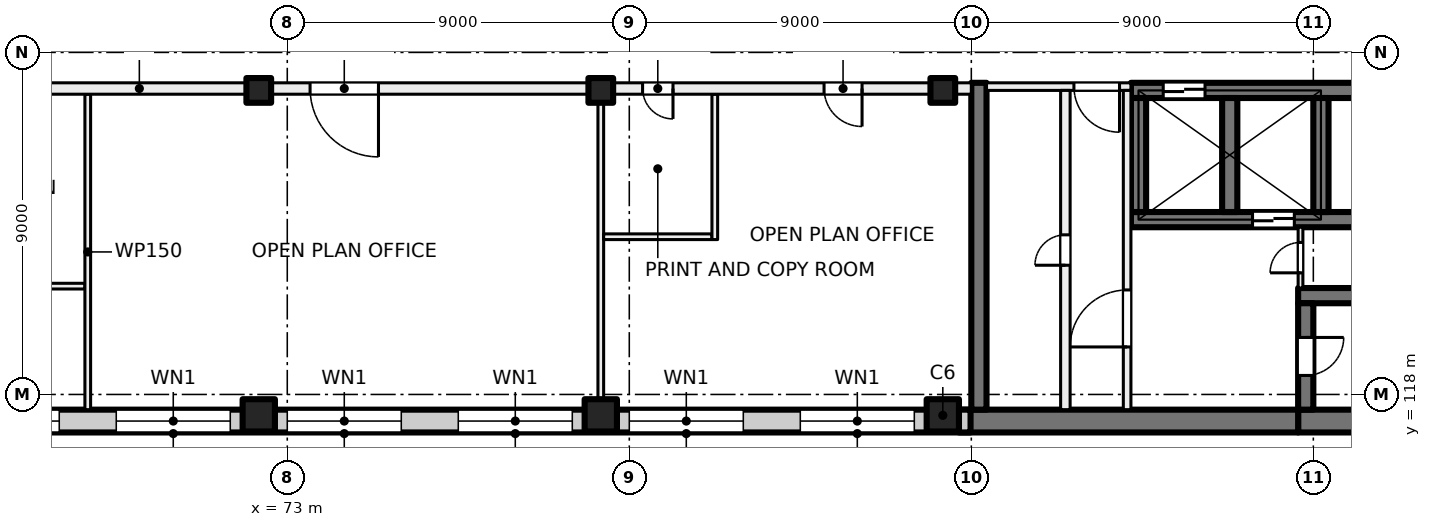
"""IFC4 building model, lengths in metres.
Left out: names, types, materials, properties, quantities, classifications, styles, units other than length and angle.
Written with IfcOpenShell. Run it as: python <this file> out.ifc"""

import sys

from ifc_helpers import new_model, si_unit, direction, frame, frame_2d, origin, origin_2d, place, context, subcontext, project, spatial, rectangle, extrude, element, fill, save


model = new_model("IFC4")
c1 = context("Model", 3, precision=1e-05, world=origin(), true_north=direction((0.0, 1.0)))
c2 = subcontext(c1, "Body", "Model", "MODEL_VIEW")
j1 = project(units=[si_unit("LENGTHUNIT", "METRE"), si_unit("PLANEANGLEUNIT", "RADIAN")], contexts=[c1])
p1 = place(None, origin())
s1 = spatial("IfcSite", under=j1, at=p1, CompositionType="ELEMENT")
p2 = place(p1, origin())
s2 = spatial("IfcBuilding", under=s1, at=p2, CompositionType="ELEMENT")
p3 = place(p2, frame((0.0, 0.0, 101.0)))
s3 = spatial("IfcBuildingStorey", under=s2, at=p3, CompositionType="ELEMENT", Elevation=101.0)
for number, where, z_axis, x_axis in (
    (1, (72.25, 126.0, 0.0), (0.0, 0.0, 1.0), (1.0, 0.0, 0.0)),
    (2, (81.25, 126.0, 0.0), (0.0, 0.0, 1.0), (1.0, 0.0, 0.0)),
    (3, (90.25, 126.0, 0.0), (0.0, 0.0, 1.0), (1.0, 0.0, 0.0)),
):
    element("IfcColumn", number, at=place(p3, frame(where, z_axis=z_axis, x_axis=x_axis)), inside=s3, PredefinedType="COLUMN", context=c2, shape_type="SweptSolid", body=[
        extrude(rectangle(XDim=0.65, YDim=0.65, at=origin_2d()), origin(), (0.0, 0.0, 1.0), 4.0),
    ])
for number, where, z_axis, x_axis in (
    (4, (72.25, 117.45, 0.0), (0.0, 0.0, 1.0), (1.0, 0.0, 0.0)),
    (5, (81.25, 117.45, 0.0), (0.0, 0.0, 1.0), (1.0, 0.0, 0.0)),
    (6, (90.25, 117.45, 0.0), (0.0, 0.0, 1.0), (1.0, 0.0, 0.0)),
):
    element("IfcColumn", number, at=place(p3, frame(where, z_axis=z_axis, x_axis=x_axis)), inside=s3, PredefinedType="COLUMN", context=c2, shape_type="SweptSolid", body=[
        extrude(rectangle(XDim=0.85, YDim=0.85, at=origin_2d()), origin(), (0.0, 0.0, 1.0), 4.0),
    ])
p4 = place(p3, frame((107.4, 117.3, 0.0), z_axis=(0.0, 0.0, 1.0), x_axis=(-1.0, 0.0, 0.0)))
e7 = element("IfcWall", 7, at=p4, inside=s3, PredefinedType="SHEAR", context=c2, shape_type="SweptSolid", body=[
    extrude(rectangle(XDim=7.8, YDim=0.6, at=frame_2d((3.9, 0.0))), origin(), (0.0, 0.0, 1.0), 4.0),
])
p5 = place(p3, frame((99.6, 117.3, 0.0), z_axis=(0.0, 0.0, 1.0), x_axis=(-1.0, 0.0, 0.0)))
e8 = element("IfcWall", 8, at=p5, inside=s3, PredefinedType="SHEAR", context=c2, shape_type="SweptSolid", body=[
    extrude(rectangle(XDim=8.925, YDim=0.6, at=frame_2d((4.462, 0.0))), origin(), (0.0, 0.0, 1.0), 4.0),
])
p6 = place(p3, frame((107.4, 120.6, 0.0), z_axis=(0.0, 0.0, 1.0), x_axis=(-1.0, 0.0, 0.0)))
e9 = element("IfcWall", 9, at=p6, inside=s3, PredefinedType="SHEAR", context=c2, shape_type="SweptSolid", body=[
    extrude(rectangle(XDim=7.8, YDim=0.4, at=frame_2d((3.9, 0.0))), origin(), (0.0, 0.0, 1.0), 4.0),
])
p7 = place(p3, frame((99.8, 120.4, 0.0), z_axis=(0.0, 0.0, 1.0), x_axis=(0.0, -1.0, 0.0)))
e10 = element("IfcWall", 10, at=p7, inside=s3, PredefinedType="SHEAR", context=c2, shape_type="SweptSolid", body=[
    extrude(rectangle(XDim=2.8, YDim=0.4, at=frame_2d((1.4, 0.0))), origin(), (0.0, 0.0, 1.0), 4.0),
])
p8 = place(p7, frame((0.9, 0.0, 0.0)))
e11 = element("IfcOpeningElement", 11, at=p8, cuts=e10, PredefinedType="OPENING", context=c2, shape_type="SweptSolid", body=[
    extrude(rectangle(XDim=1.0, YDim=2.1, at=frame_2d((0.5, 1.05))), frame((0.0, 0.21, 0.0), z_axis=(0.0, -1.0, 0.0), x_axis=(1.0, 0.0, 0.0)), (0.0, 0.0, 1.0), 0.42),
])
p9 = place(p3, frame((107.4, 126.0, 0.0), z_axis=(0.0, 0.0, 1.0), x_axis=(-1.0, 0.0, 0.0)))
e12 = element("IfcWall", 12, at=p9, inside=s3, PredefinedType="SHEAR", context=c2, shape_type="SweptSolid", body=[
    extrude(rectangle(XDim=12.2, YDim=0.4, at=frame_2d((6.1, 0.0))), origin(), (0.0, 0.0, 1.0), 4.0),
])
p10 = place(p9, frame((10.25, 0.0, 0.0)))
e13 = element("IfcOpeningElement", 13, at=p10, cuts=e12, PredefinedType="OPENING", context=c2, shape_type="SweptSolid", body=[
    extrude(rectangle(XDim=1.1, YDim=2.1, at=frame_2d((0.55, 1.05))), frame((0.0, 0.21, 0.0), z_axis=(0.0, -1.0, 0.0), x_axis=(1.0, 0.0, 0.0)), (0.0, 0.0, 1.0), 0.42),
])
p11 = place(p9, frame((0.7, 0.0, 0.0)))
e14 = element("IfcOpeningElement", 14, at=p11, cuts=e12, PredefinedType="OPENING", context=c2, shape_type="SweptSolid", body=[
    extrude(rectangle(XDim=0.8, YDim=2.1, at=frame_2d((0.4, 1.05))), frame((0.0, 0.21, 0.0), z_axis=(0.0, -1.0, 0.0), x_axis=(1.0, 0.0, 0.0)), (0.0, 0.0, 1.0), 0.42),
])
p12 = place(p3, frame((107.4, 122.6, 0.0), z_axis=(0.0, 0.0, 1.0), x_axis=(-1.0, 0.0, 0.0)))
e15 = element("IfcWall", 15, at=p12, inside=s3, PredefinedType="SHEAR", context=c2, shape_type="SweptSolid", body=[
    extrude(rectangle(XDim=12.2, YDim=0.4, at=frame_2d((6.1, 0.0))), origin(), (0.0, 0.0, 1.0), 4.0),
])
p13 = place(p12, frame((7.9, 0.0, 0.0)))
e16 = element("IfcOpeningElement", 16, at=p13, cuts=e15, PredefinedType="OPENING", context=c2, shape_type="SweptSolid", body=[
    extrude(rectangle(XDim=1.1, YDim=2.1, at=frame_2d((0.55, 1.05))), frame((0.0, 0.21, 0.0), z_axis=(0.0, -1.0, 0.0), x_axis=(1.0, 0.0, 0.0)), (0.0, 0.0, 1.0), 0.42),
])
for number, where, z_axis, x_axis in (
    (17, (100.2, 125.8, 0.0), (0.0, 0.0, 1.0), (0.0, -1.0, 0.0)),
    (18, (97.8, 125.8, 0.0), (0.0, 0.0, 1.0), (0.0, -1.0, 0.0)),
    (19, (95.4, 125.8, 0.0), (0.0, 0.0, 1.0), (0.0, -1.0, 0.0)),
):
    element("IfcWall", number, at=place(p3, frame(where, z_axis=z_axis, x_axis=x_axis)), inside=s3, PredefinedType="SHEAR", context=c2, shape_type="SweptSolid", body=[
        extrude(rectangle(XDim=3.0, YDim=0.4, at=frame_2d((1.5, 0.0))), origin(), (0.0, 0.0, 1.0), 4.0),
    ])
p14 = place(p3, frame((91.2, 126.2, 0.0), z_axis=(0.0, 0.0, 1.0), x_axis=(0.0, -1.0, 0.0)))
e20 = element("IfcWall", 20, at=p14, inside=s3, PredefinedType="SHEAR", context=c2, shape_type="SweptSolid", body=[
    extrude(rectangle(XDim=8.6, YDim=0.4, at=frame_2d((4.3, 0.0))), origin(), (0.0, 0.0, 1.0), 4.0),
])
p15 = place(p3, frame((90.98, 117.3, 0.0), z_axis=(0.0, 0.0, 1.0), x_axis=(-1.0, 0.0, 0.0)))
e21 = element("IfcWall", 21, at=p15, inside=s3, PredefinedType="SOLIDWALL", context=c2, shape_type="SweptSolid", body=[
    extrude(rectangle(XDim=33.745, YDim=0.6, at=frame_2d((16.873, 0.0))), origin(), (0.0, 0.0, 1.0), 3.625),
])
p16 = place(p15, frame((1.48, 0.0, 0.9)))
e22 = element("IfcOpeningElement", 22, at=p16, cuts=e21, PredefinedType="OPENING", context=c2, shape_type="SweptSolid", body=[
    extrude(rectangle(XDim=3.0, YDim=2.4, at=frame_2d((1.5, 1.2))), frame((0.0, 0.31, 0.0), z_axis=(0.0, -1.0, 0.0), x_axis=(1.0, 0.0, 0.0)), (0.0, 0.0, 1.0), 0.62),
])
p17 = place(p15, frame((5.98, 0.0, 0.9)))
e23 = element("IfcOpeningElement", 23, at=p17, cuts=e21, PredefinedType="OPENING", context=c2, shape_type="SweptSolid", body=[
    extrude(rectangle(XDim=3.0, YDim=2.4, at=frame_2d((1.5, 1.2))), frame((0.0, 0.31, 0.0), z_axis=(0.0, -1.0, 0.0), x_axis=(1.0, 0.0, 0.0)), (0.0, 0.0, 1.0), 0.62),
])
p18 = place(p15, frame((10.48, 0.0, 0.9)))
e24 = element("IfcOpeningElement", 24, at=p18, cuts=e21, PredefinedType="OPENING", context=c2, shape_type="SweptSolid", body=[
    extrude(rectangle(XDim=3.0, YDim=2.4, at=frame_2d((1.5, 1.2))), frame((0.0, 0.31, 0.0), z_axis=(0.0, -1.0, 0.0), x_axis=(1.0, 0.0, 0.0)), (0.0, 0.0, 1.0), 0.62),
])
p19 = place(p15, frame((14.98, 0.0, 0.9)))
e25 = element("IfcOpeningElement", 25, at=p19, cuts=e21, PredefinedType="OPENING", context=c2, shape_type="SweptSolid", body=[
    extrude(rectangle(XDim=3.0, YDim=2.4, at=frame_2d((1.5, 1.2))), frame((0.0, 0.31, 0.0), z_axis=(0.0, -1.0, 0.0), x_axis=(1.0, 0.0, 0.0)), (0.0, 0.0, 1.0), 0.62),
])
p20 = place(p15, frame((19.48, 0.0, 0.9)))
e26 = element("IfcOpeningElement", 26, at=p20, cuts=e21, PredefinedType="OPENING", context=c2, shape_type="SweptSolid", body=[
    extrude(rectangle(XDim=3.0, YDim=2.4, at=frame_2d((1.5, 1.2))), frame((0.0, 0.31, 0.0), z_axis=(0.0, -1.0, 0.0), x_axis=(1.0, 0.0, 0.0)), (0.0, 0.0, 1.0), 0.62),
])
p21 = place(p15, frame((23.98, 0.0, 0.9)))
e27 = element("IfcOpeningElement", 27, at=p21, cuts=e21, PredefinedType="OPENING", context=c2, shape_type="SweptSolid", body=[
    extrude(rectangle(XDim=3.0, YDim=2.4, at=frame_2d((1.5, 1.2))), frame((0.0, 0.31, 0.0), z_axis=(0.0, -1.0, 0.0), x_axis=(1.0, 0.0, 0.0)), (0.0, 0.0, 1.0), 0.62),
])
p22 = place(p15, frame((28.48, 0.0, 0.9)))
e28 = element("IfcOpeningElement", 28, at=p22, cuts=e21, PredefinedType="OPENING", context=c2, shape_type="SweptSolid", body=[
    extrude(rectangle(XDim=3.0, YDim=2.4, at=frame_2d((1.5, 1.2))), frame((0.0, 0.31, 0.0), z_axis=(0.0, -1.0, 0.0), x_axis=(1.0, 0.0, 0.0)), (0.0, 0.0, 1.0), 0.62),
])
p23 = place(p3, frame((95.2, 126.1, 0.0), z_axis=(0.0, 0.0, 1.0), x_axis=(-1.0, 0.0, 0.0)))
e29 = element("IfcWall", 29, at=p23, inside=s3, PredefinedType="PARTITIONING", context=c2, shape_type="SweptSolid", body=[
    extrude(rectangle(XDim=3.8, YDim=0.2, at=frame_2d((1.9, 0.0))), origin(), (0.0, 0.0, 1.0), 3.625),
])
p24 = place(p23, frame((0.3, 0.0, 0.0)))
e30 = element("IfcOpeningElement", 30, at=p24, cuts=e29, PredefinedType="OPENING", context=c2, shape_type="SweptSolid", body=[
    extrude(rectangle(XDim=1.2, YDim=2.1, at=frame_2d((0.6, 1.05))), frame((0.0, 0.11, 0.0), z_axis=(0.0, -1.0, 0.0), x_axis=(1.0, 0.0, 0.0)), (0.0, 0.0, 1.0), 0.22),
])
p25 = place(p3, frame((95.1, 117.6, 0.0), z_axis=(0.0, 0.0, 1.0), x_axis=(0.0, 1.0, 0.0)))
e31 = element("IfcWall", 31, at=p25, inside=s3, PredefinedType="PARTITIONING", context=c2, shape_type="SweptSolid", body=[
    extrude(rectangle(XDim=8.4, YDim=0.2, at=frame_2d((4.2, 0.0))), origin(), (0.0, 0.0, 1.0), 3.625),
])
p26 = place(p25, frame((1.65, 0.0, 0.0)))
e32 = element("IfcOpeningElement", 32, at=p26, cuts=e31, PredefinedType="OPENING", context=c2, shape_type="SweptSolid", body=[
    extrude(rectangle(XDim=1.5, YDim=2.1, at=frame_2d((0.75, 1.05))), frame((0.0, 0.11, 0.0), z_axis=(0.0, -1.0, 0.0), x_axis=(1.0, 0.0, 0.0)), (0.0, 0.0, 1.0), 0.22),
])
p27 = place(p3, frame((93.475, 117.6, 0.0), z_axis=(0.0, 0.0, 1.0), x_axis=(0.0, 1.0, 0.0)))
e33 = element("IfcWall", 33, at=p27, inside=s3, PredefinedType="PARTITIONING", context=c2, shape_type="SweptSolid", body=[
    extrude(rectangle(XDim=8.4, YDim=0.25, at=frame_2d((4.2, 0.0))), origin(), (0.0, 0.0, 1.0), 3.625),
])
p28 = place(p27, frame((3.8, 0.0, 0.0)))
e34 = element("IfcOpeningElement", 34, at=p28, cuts=e33, PredefinedType="OPENING", context=c2, shape_type="SweptSolid", body=[
    extrude(rectangle(XDim=0.8, YDim=2.1, at=frame_2d((0.4, 1.05))), frame((0.0, 0.135, 0.0), z_axis=(0.0, -1.0, 0.0), x_axis=(1.0, 0.0, 0.0)), (0.0, 0.0, 1.0), 0.27),
])
p29 = place(p3, frame((99.663, 120.8, 0.0), z_axis=(0.0, 0.0, 1.0), x_axis=(0.0, 1.0, 0.0)))
e35 = element("IfcWall", 35, at=p29, inside=s3, PredefinedType="PARTITIONING", context=c2, shape_type="SweptSolid", body=[
    extrude(rectangle(XDim=1.6, YDim=0.125, at=frame_2d((0.8, 0.0))), origin(), (0.0, 0.0, 1.0), 3.625),
])
p30 = place(p29, frame((0.4, 0.0, 0.0)))
e36 = element("IfcOpeningElement", 36, at=p30, cuts=e35, PredefinedType="OPENING", context=c2, shape_type="SweptSolid", body=[
    extrude(rectangle(XDim=0.8, YDim=2.1, at=frame_2d((0.4, 1.05))), frame((0.0, 0.073, 0.0), z_axis=(0.0, -1.0, 0.0), x_axis=(1.0, 0.0, 0.0)), (0.0, 0.0, 1.0), 0.145),
])
p31 = place(p3, frame((63.325, 120.85, 0.0), z_axis=(0.0, 0.0, 1.0), x_axis=(1.0, 0.0, 0.0)))
e37 = element("IfcWall", 37, at=p31, inside=s3, PredefinedType="PARTITIONING", context=c2, shape_type="SweptSolid", body=[
    extrude(rectangle(XDim=4.35, YDim=0.15, at=frame_2d((2.175, 0.0))), origin(), (0.0, 0.0, 1.0), 3.625),
])
p32 = place(p31, frame((1.675, 0.0, 0.0)))
e38 = element("IfcOpeningElement", 38, at=p32, cuts=e37, PredefinedType="OPENING", context=c2, shape_type="SweptSolid", body=[
    extrude(rectangle(XDim=1.0, YDim=2.1, at=frame_2d((0.5, 1.05))), frame((0.0, 0.085, 0.0), z_axis=(0.0, -1.0, 0.0), x_axis=(1.0, 0.0, 0.0)), (0.0, 0.0, 1.0), 0.17),
])
for number, where, z_axis, x_axis in (
    (39, (67.75, 117.6, 0.0), (0.0, 0.0, 1.0), (0.0, 1.0, 0.0)),
    (40, (81.25, 117.6, 0.0), (0.0, 0.0, 1.0), (0.0, 1.0, 0.0)),
):
    element("IfcWall", number, at=place(p3, frame(where, z_axis=z_axis, x_axis=x_axis)), inside=s3, PredefinedType="PARTITIONING", context=c2, shape_type="SweptSolid", body=[
        extrude(rectangle(XDim=8.3, YDim=0.15, at=frame_2d((4.15, 0.0))), origin(), (0.0, 0.0, 1.0), 3.625),
    ])
p33 = place(p3, frame((84.175, 122.15, 0.0), z_axis=(0.0, 0.0, 1.0), x_axis=(-1.0, 0.0, 0.0)))
e41 = element("IfcWall", 41, at=p33, inside=s3, PredefinedType="PARTITIONING", context=c2, shape_type="SweptSolid", body=[
    extrude(rectangle(XDim=2.85, YDim=0.15, at=frame_2d((1.425, 0.0))), origin(), (0.0, 0.0, 1.0), 3.625),
])
p34 = place(p3, frame((84.25, 125.9, 0.0), z_axis=(0.0, 0.0, 1.0), x_axis=(0.0, -1.0, 0.0)))
e42 = element("IfcWall", 42, at=p34, inside=s3, PredefinedType="PARTITIONING", context=c2, shape_type="SweptSolid", body=[
    extrude(rectangle(XDim=3.825, YDim=0.15, at=frame_2d((1.913, 0.0))), origin(), (0.0, 0.0, 1.0), 3.625),
])
p35 = place(p3, frame((91.0, 126.05, 0.0), z_axis=(0.0, 0.0, 1.0), x_axis=(-1.0, 0.0, 0.0)))
e43 = element("IfcWall", 43, at=p35, inside=s3, PredefinedType="PARTITIONING", context=c2, shape_type="SweptSolid", body=[
    extrude(rectangle(XDim=43.785, YDim=0.3, at=frame_2d((21.893, 0.0))), origin(), (0.0, 0.0, 1.0), 3.625),
])
p36 = place(p35, frame((7.85, 0.0, 0.0)))
e44 = element("IfcOpeningElement", 44, at=p36, cuts=e43, PredefinedType="OPENING", context=c2, shape_type="SweptSolid", body=[
    extrude(rectangle(XDim=0.8, YDim=2.1, at=frame_2d((0.4, 1.05))), frame((0.0, 0.16, 0.0), z_axis=(0.0, -1.0, 0.0), x_axis=(1.0, 0.0, 0.0)), (0.0, 0.0, 1.0), 0.32),
])
p37 = place(p35, frame((2.875, 0.0, 0.0)))
e45 = element("IfcOpeningElement", 45, at=p37, cuts=e43, PredefinedType="OPENING", context=c2, shape_type="SweptSolid", body=[
    extrude(rectangle(XDim=1.0, YDim=2.1, at=frame_2d((0.5, 1.05))), frame((0.0, 0.16, 0.0), z_axis=(0.0, -1.0, 0.0), x_axis=(1.0, 0.0, 0.0)), (0.0, 0.0, 1.0), 0.32),
])
p38 = place(p35, frame((15.6, 0.0, 0.0)))
e46 = element("IfcOpeningElement", 46, at=p38, cuts=e43, PredefinedType="OPENING", context=c2, shape_type="SweptSolid", body=[
    extrude(rectangle(XDim=1.8, YDim=2.1, at=frame_2d((0.9, 1.05))), frame((0.0, 0.16, 0.0), z_axis=(0.0, -1.0, 0.0), x_axis=(1.0, 0.0, 0.0)), (0.0, 0.0, 1.0), 0.32),
])
p39 = place(p35, frame((25.0, 0.0, 0.0)))
e47 = element("IfcOpeningElement", 47, at=p39, cuts=e43, PredefinedType="OPENING", context=c2, shape_type="SweptSolid", body=[
    extrude(rectangle(XDim=1.0, YDim=2.1, at=frame_2d((0.5, 1.05))), frame((0.0, 0.16, 0.0), z_axis=(0.0, -1.0, 0.0), x_axis=(1.0, 0.0, 0.0)), (0.0, 0.0, 1.0), 0.32),
])
p40 = place(p35, frame((39.296, 0.0, 0.0)))
e48 = element("IfcOpeningElement", 48, at=p40, cuts=e43, PredefinedType="OPENING", context=c2, shape_type="SweptSolid", body=[
    extrude(rectangle(XDim=1.8, YDim=2.1, at=frame_2d((0.9, 1.05))), frame((0.0, 0.16, 0.0), z_axis=(0.0, -1.0, 0.0), x_axis=(1.0, 0.0, 0.0)), (0.0, 0.0, 1.0), 0.32),
])
p41 = place(p16, origin())
e49 = element("IfcWindow", 49, at=p41, inside=s3, PartitioningType="SINGLE_PANEL", PredefinedType="WINDOW", context=c2, shape_type="SweptSolid", body=[
    extrude(rectangle(XDim=3.0, YDim=2.4, at=frame_2d((1.5, 1.2))), frame((0.0, 0.03, 0.0), z_axis=(0.0, -1.0, 0.0), x_axis=(1.0, 0.0, 0.0)), (0.0, 0.0, 1.0), 0.06),
])
fill(e22, e49)
p42 = place(p17, origin())
e50 = element("IfcWindow", 50, at=p42, inside=s3, PartitioningType="SINGLE_PANEL", PredefinedType="WINDOW", context=c2, shape_type="SweptSolid", body=[
    extrude(rectangle(XDim=3.0, YDim=2.4, at=frame_2d((1.5, 1.2))), frame((0.0, 0.03, 0.0), z_axis=(0.0, -1.0, 0.0), x_axis=(1.0, 0.0, 0.0)), (0.0, 0.0, 1.0), 0.06),
])
fill(e23, e50)
p43 = place(p18, origin())
e51 = element("IfcWindow", 51, at=p43, inside=s3, PartitioningType="SINGLE_PANEL", PredefinedType="WINDOW", context=c2, shape_type="SweptSolid", body=[
    extrude(rectangle(XDim=3.0, YDim=2.4, at=frame_2d((1.5, 1.2))), frame((0.0, 0.03, 0.0), z_axis=(0.0, -1.0, 0.0), x_axis=(1.0, 0.0, 0.0)), (0.0, 0.0, 1.0), 0.06),
])
fill(e24, e51)
p44 = place(p19, origin())
e52 = element("IfcWindow", 52, at=p44, inside=s3, PartitioningType="SINGLE_PANEL", PredefinedType="WINDOW", context=c2, shape_type="SweptSolid", body=[
    extrude(rectangle(XDim=3.0, YDim=2.4, at=frame_2d((1.5, 1.2))), frame((0.0, 0.03, 0.0), z_axis=(0.0, -1.0, 0.0), x_axis=(1.0, 0.0, 0.0)), (0.0, 0.0, 1.0), 0.06),
])
fill(e25, e52)
p45 = place(p20, origin())
e53 = element("IfcWindow", 53, at=p45, inside=s3, PartitioningType="SINGLE_PANEL", PredefinedType="WINDOW", context=c2, shape_type="SweptSolid", body=[
    extrude(rectangle(XDim=3.0, YDim=2.4, at=frame_2d((1.5, 1.2))), frame((0.0, 0.03, 0.0), z_axis=(0.0, -1.0, 0.0), x_axis=(1.0, 0.0, 0.0)), (0.0, 0.0, 1.0), 0.06),
])
fill(e26, e53)
p46 = place(p21, origin())
e54 = element("IfcWindow", 54, at=p46, inside=s3, PartitioningType="SINGLE_PANEL", PredefinedType="WINDOW", context=c2, shape_type="SweptSolid", body=[
    extrude(rectangle(XDim=3.0, YDim=2.4, at=frame_2d((1.5, 1.2))), frame((0.0, 0.03, 0.0), z_axis=(0.0, -1.0, 0.0), x_axis=(1.0, 0.0, 0.0)), (0.0, 0.0, 1.0), 0.06),
])
fill(e27, e54)
p47 = place(p10, origin())
e55 = element("IfcDoor", 55, at=p47, inside=s3, OperationType="DOUBLE_DOOR_SLIDING", PredefinedType="DOOR", context=c2, shape_type="SweptSolid", body=[
    extrude(rectangle(XDim=1.1, YDim=2.1, at=frame_2d((0.55, 1.05))), frame((0.0, 0.025, 0.0), z_axis=(0.0, -1.0, 0.0), x_axis=(1.0, 0.0, 0.0)), (0.0, 0.0, 1.0), 0.05),
])
fill(e13, e55)
p48 = place(p24, origin())
e56 = element("IfcDoor", 56, at=p48, inside=s3, OperationType="DOUBLE_DOOR_SINGLE_SWING", PredefinedType="DOOR", context=c2, shape_type="SweptSolid", body=[
    extrude(rectangle(XDim=1.2, YDim=2.1, at=frame_2d((0.6, 1.05))), frame((0.0, 0.025, 0.0), z_axis=(0.0, -1.0, 0.0), x_axis=(1.0, 0.0, 0.0)), (0.0, 0.0, 1.0), 0.05),
])
fill(e30, e56)
p49 = place(p26, origin())
e57 = element("IfcDoor", 57, at=p49, inside=s3, OperationType="DOUBLE_DOOR_SINGLE_SWING", PredefinedType="DOOR", context=c2, shape_type="SweptSolid", body=[
    extrude(rectangle(XDim=1.5, YDim=2.1, at=frame_2d((0.75, 1.05))), frame((0.0, 0.025, 0.0), z_axis=(0.0, -1.0, 0.0), x_axis=(1.0, 0.0, 0.0)), (0.0, 0.0, 1.0), 0.05),
])
fill(e32, e57)
p50 = place(p8, origin())
e58 = element("IfcDoor", 58, at=p50, inside=s3, OperationType="SINGLE_SWING_LEFT", PredefinedType="DOOR", context=c2, shape_type="SweptSolid", body=[
    extrude(rectangle(XDim=1.0, YDim=2.1, at=frame_2d((0.5, 1.05))), frame((0.0, 0.025, 0.0), z_axis=(0.0, -1.0, 0.0), x_axis=(1.0, 0.0, 0.0)), (0.0, 0.0, 1.0), 0.05),
])
fill(e11, e58)
p51 = place(p30, origin())
e59 = element("IfcDoor", 59, at=p51, inside=s3, OperationType="SINGLE_SWING_RIGHT", PredefinedType="DOOR", context=c2, shape_type="SweptSolid", body=[
    extrude(rectangle(XDim=0.8, YDim=2.1, at=frame_2d((0.4, 1.05))), frame((0.0, 0.025, 0.0), z_axis=(0.0, -1.0, 0.0), x_axis=(1.0, 0.0, 0.0)), (0.0, 0.0, 1.0), 0.05),
])
fill(e36, e59)
p52 = place(p28, origin())
e60 = element("IfcDoor", 60, at=p52, inside=s3, OperationType="SINGLE_SWING_LEFT", PredefinedType="DOOR", context=c2, shape_type="SweptSolid", body=[
    extrude(rectangle(XDim=0.8, YDim=2.1, at=frame_2d((0.4, 1.05))), frame((0.0, 0.025, 0.0), z_axis=(0.0, -1.0, 0.0), x_axis=(1.0, 0.0, 0.0)), (0.0, 0.0, 1.0), 0.05),
])
fill(e34, e60)
p53 = place(p13, origin())
e61 = element("IfcDoor", 61, at=p53, inside=s3, OperationType="DOUBLE_DOOR_SLIDING", PredefinedType="DOOR", context=c2, shape_type="SweptSolid", body=[
    extrude(rectangle(XDim=1.1, YDim=2.1, at=frame_2d((0.55, 1.05))), frame((0.0, 0.025, 0.0), z_axis=(0.0, -1.0, 0.0), x_axis=(1.0, 0.0, 0.0)), (0.0, 0.0, 1.0), 0.05),
])
fill(e16, e61)
p54 = place(p36, origin())
e62 = element("IfcDoor", 62, at=p54, inside=s3, OperationType="SINGLE_SWING_RIGHT", PredefinedType="DOOR", context=c2, shape_type="SweptSolid", body=[
    extrude(rectangle(XDim=0.8, YDim=2.1, at=frame_2d((0.4, 1.05))), frame((0.0, 0.025, 0.0), z_axis=(0.0, -1.0, 0.0), x_axis=(1.0, 0.0, 0.0)), (0.0, 0.0, 1.0), 0.05),
])
fill(e44, e62)
p55 = place(p37, origin())
e63 = element("IfcDoor", 63, at=p55, inside=s3, OperationType="SINGLE_SWING_LEFT", PredefinedType="DOOR", context=c2, shape_type="SweptSolid", body=[
    extrude(rectangle(XDim=1.0, YDim=2.1, at=frame_2d((0.5, 1.05))), frame((0.0, 0.025, 0.0), z_axis=(0.0, -1.0, 0.0), x_axis=(1.0, 0.0, 0.0)), (0.0, 0.0, 1.0), 0.05),
])
fill(e45, e63)
p56 = place(p38, origin())
e64 = element("IfcDoor", 64, at=p56, inside=s3, OperationType="DOUBLE_DOOR_SINGLE_SWING", PredefinedType="DOOR", context=c2, shape_type="SweptSolid", body=[
    extrude(rectangle(XDim=1.8, YDim=2.1, at=frame_2d((0.9, 1.05))), frame((0.0, 0.025, 0.0), z_axis=(0.0, -1.0, 0.0), x_axis=(1.0, 0.0, 0.0)), (0.0, 0.0, 1.0), 0.05),
])
fill(e46, e64)
save(model, sys.argv[1])
